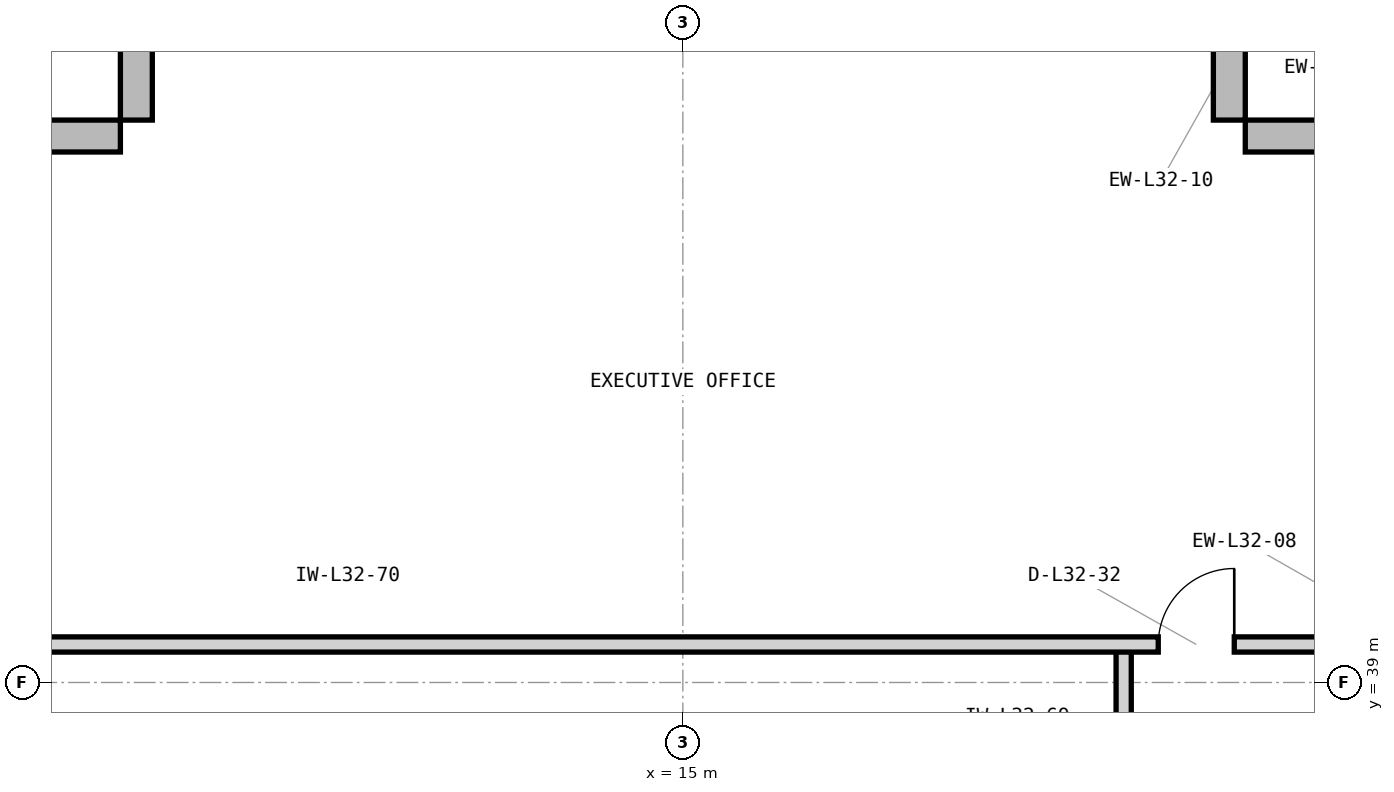
"""IFC4 building model, lengths in metres.
Left out: names, types, materials, properties, quantities, classifications, styles, units other than length and angle.
Written with IfcOpenShell. Run it as: python <this file> out.ifc"""

import sys

from ifc_helpers import new_model, si_unit, direction, frame, frame_2d, origin, place, context, subcontext, project, spatial, rectangle, extrude, element, fill, save


model = new_model("IFC4")
c1 = context("Model", 3, precision=1e-05, world=origin(), true_north=direction((0.0, 1.0)))
c2 = subcontext(c1, "Body", "Model", "MODEL_VIEW")
j1 = project(units=[si_unit("LENGTHUNIT", "METRE"), si_unit("PLANEANGLEUNIT", "RADIAN")], contexts=[c1])
p1 = place(None, origin())
s1 = spatial("IfcSite", under=j1, at=p1, CompositionType="ELEMENT")
p2 = place(p1, origin())
s2 = spatial("IfcBuilding", under=s1, at=p2, CompositionType="ELEMENT")
p3 = place(p2, frame((0.0, 0.0, 136.2)))
s3 = spatial("IfcBuildingStorey", under=s2, at=p3, CompositionType="ELEMENT", Elevation=136.2)
for number, where, z_axis, x_axis in (
    (1, (24.0, 46.19, 0.0), (0.0, 0.0, 1.0), (-1.0, 0.0, 0.0)),
    (2, (22.19, 46.4, 0.0), (0.0, 0.0, 1.0), (0.0, 1.0, 0.0)),
    (3, (7.81, 48.0, 0.0), (0.0, 0.0, 1.0), (0.0, -1.0, 0.0)),
    (4, (7.6, 46.19, 0.0), (0.0, 0.0, 1.0), (-1.0, 0.0, 0.0)),
):
    element("IfcWall", number, at=place(p3, frame(where, z_axis=z_axis, x_axis=x_axis)), inside=s3, PredefinedType="STANDARD", context=c2, shape_type="SweptSolid", body=[
        extrude(rectangle(XDim=1.6, YDim=0.42, at=frame_2d((0.8, 0.0))), origin(), (0.0, 0.0, 1.0), 3.7),
    ])
p4 = place(p3, frame((20.8, 35.68, 0.0), z_axis=(0.0, 0.0, 1.0), x_axis=(0.0, 1.0, 0.0)))
e5 = element("IfcWall", 5, at=p4, inside=s3, PredefinedType="PARTITIONING", context=c2, shape_type="SweptSolid", body=[
    extrude(rectangle(XDim=3.82, YDim=0.2, at=frame_2d((1.91, 0.0))), origin(), (0.0, 0.0, 1.0), 3.69),
])
p5 = place(p4, frame((1.41, 0.0, 0.0)))
e6 = element("IfcOpeningElement", 6, at=p5, cuts=e5, PredefinedType="OPENING", context=c2, shape_type="SweptSolid", body=[
    extrude(rectangle(XDim=1.0, YDim=2.15, at=frame_2d((0.5, 1.075))), frame((0.0, 0.11, 0.0), z_axis=(0.0, -1.0, 0.0), x_axis=(1.0, 0.0, 0.0)), (0.0, 0.0, 1.0), 0.22),
])
p6 = place(p3, frame((6.18, 39.5, 0.0), z_axis=(0.0, 0.0, 1.0), x_axis=(1.0, 0.0, 0.0)))
e7 = element("IfcWall", 7, at=p6, inside=s3, PredefinedType="PARTITIONING", context=c2, shape_type="SweptSolid", body=[
    extrude(rectangle(XDim=17.64, YDim=0.2, at=frame_2d((8.82, 0.0))), origin(), (0.0, 0.0, 1.0), 3.69),
])
p7 = place(p6, frame((15.075, 0.0, 0.0)))
e8 = element("IfcOpeningElement", 8, at=p7, cuts=e7, PredefinedType="OPENING", context=c2, shape_type="SweptSolid", body=[
    extrude(rectangle(XDim=1.0, YDim=2.15, at=frame_2d((0.5, 1.075))), frame((0.0, 0.11, 0.0), z_axis=(0.0, -1.0, 0.0), x_axis=(1.0, 0.0, 0.0)), (0.0, 0.0, 1.0), 0.22),
])
p8 = place(p7, origin())
e9 = element("IfcDoor", 9, at=p8, inside=s3, OperationType="SINGLE_SWING_RIGHT", PredefinedType="DOOR", context=c2, shape_type="SweptSolid", body=[
    extrude(rectangle(XDim=1.0, YDim=2.15, at=frame_2d((0.5, 1.075))), frame((0.0, 0.025, 0.0), z_axis=(0.0, -1.0, 0.0), x_axis=(1.0, 0.0, 0.0)), (0.0, 0.0, 1.0), 0.05),
])
fill(e8, e9)
save(model, sys.argv[1])
